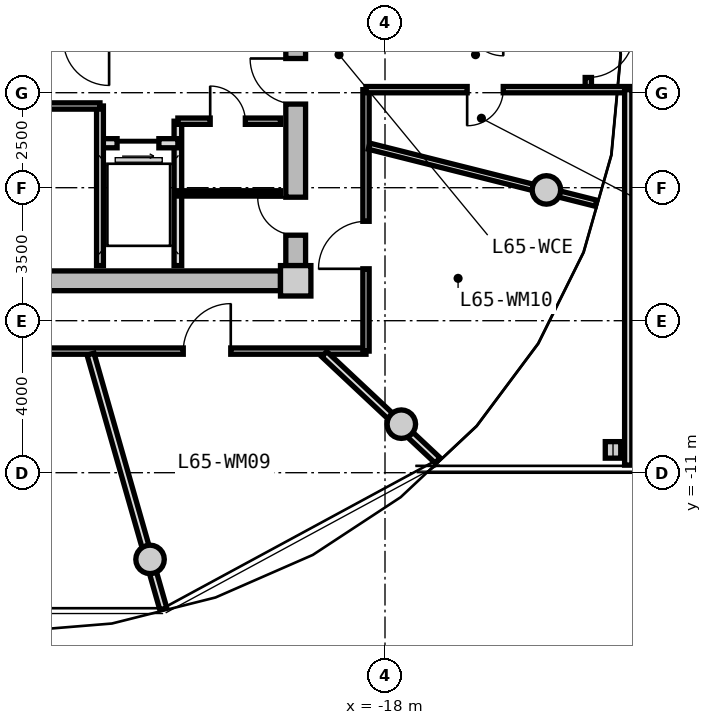
"""IFC4 building model, lengths in metres.
Left out: names, types, materials, properties, quantities, classifications, styles, units other than length and angle.
Written with IfcOpenShell. Run it as: python <this file> out.ifc"""

import sys

from ifc_helpers import new_model, si_unit, direction, frame, frame_2d, origin, origin_2d, place, context, subcontext, project, spatial, rectangle, circle, i_section, extrude, source, transform, mapped, element, fill, save


model = new_model("IFC4")
c1 = context("Model", 3, precision=1e-05, world=origin(), true_north=direction((0.0, 1.0)))
c2 = subcontext(c1, "Body", "Model", "MODEL_VIEW")
j1 = project(units=[si_unit("LENGTHUNIT", "METRE"), si_unit("PLANEANGLEUNIT", "RADIAN")], contexts=[c1])
p1 = place(None, origin())
s1 = spatial("IfcSite", under=j1, at=p1, CompositionType="ELEMENT")
p2 = place(p1, origin())
s2 = spatial("IfcBuilding", under=s1, at=p2, CompositionType="ELEMENT")
p3 = place(p2, frame((0.0, 0.0, 210.85)))
s3 = spatial("IfcBuildingStorey", under=s2, at=p3, CompositionType="ELEMENT", Elevation=210.85)
m1 = source(origin(), c2, "Body", "SweptSolid", [
    extrude(rectangle(XDim=0.8, YDim=0.8, at=origin_2d()), origin(), (0.0, 0.0, 1.0), 3.05),
])
p4 = place(p3, frame((-20.35, -5.95, 0.0), z_axis=(0.0, 0.0, 1.0), x_axis=(1.0, 0.0, 0.0)))
e1 = element("IfcColumn", 1, at=p4, inside=s3, PredefinedType="COLUMN", context=c2, shape_type="MappedRepresentation", body=[
    mapped(m1, transform((0.0, 0.0, 0.0), x_axis=(1.0, 0.0, 0.0), y_axis=(0.0, 1.0, 0.0), z_axis=(0.0, 0.0, 1.0), scale=1.0)),
])
m2 = source(origin(), c2, "Body", "SweptSolid", [
    extrude(rectangle(XDim=14.5, YDim=0.52, at=frame_2d((7.25, 0.0))), origin(), (0.0, 0.0, 1.0), 2.76),
])
p5 = place(p3, frame((-20.75, -5.95, 0.0), z_axis=(0.0, 0.0, 1.0), x_axis=(-1.0, 0.0, 0.0)))
e2 = element("IfcWall", 2, at=p5, inside=s3, PredefinedType="SHEAR", context=c2, shape_type="MappedRepresentation", body=[
    mapped(m2, transform((0.0, 0.0, 0.0), x_axis=(1.0, 0.0, 0.0), y_axis=(0.0, 1.0, 0.0), z_axis=(0.0, 0.0, 1.0), scale=1.0)),
])
m3 = source(origin(), c2, "Body", "SweptSolid", [
    extrude(rectangle(XDim=11.1, YDim=0.52, at=frame_2d((5.55, 0.0))), origin(), (0.0, 0.0, 1.0), 2.76),
])
p6 = place(p3, frame((-20.35, 5.55, 0.0), z_axis=(0.0, 0.0, 1.0), x_axis=(0.0, -1.0, 0.0)))
e3 = element("IfcWall", 3, at=p6, inside=s3, PredefinedType="SHEAR", context=c2, shape_type="MappedRepresentation", body=[
    mapped(m3, transform((0.0, 0.0, 0.0), x_axis=(1.0, 0.0, 0.0), y_axis=(0.0, 1.0, 0.0), z_axis=(0.0, 0.0, 1.0), scale=1.0)),
])
p7 = place(p6, frame((5.65, 0.0, 0.0)))
e4 = element("IfcOpeningElement", 4, at=p7, cuts=e3, PredefinedType="OPENING", context=c2, shape_type="SweptSolid", body=[
    extrude(rectangle(XDim=1.2, YDim=2.15, at=frame_2d((0.6, 1.075))), frame((0.0, 0.27, 0.0), z_axis=(0.0, -1.0, 0.0), x_axis=(1.0, 0.0, 0.0)), (0.0, 0.0, 1.0), 0.54),
])
p8 = place(p6, frame((9.3, 0.0, 0.0)))
e5 = element("IfcOpeningElement", 5, at=p8, cuts=e3, PredefinedType="OPENING", context=c2, shape_type="SweptSolid", body=[
    extrude(rectangle(XDim=1.0, YDim=2.1, at=frame_2d((0.5, 1.05))), frame((0.0, 0.27, 0.0), z_axis=(0.0, -1.0, 0.0), x_axis=(1.0, 0.0, 0.0)), (0.0, 0.0, 1.0), 0.54),
])
m4 = source(origin(), c2, "Body", "SweptSolid", [
    extrude(circle(Radius=0.375, at=origin_2d()), origin(), (0.0, 0.0, 1.0), 3.05),
])
for number, where, z_axis, x_axis in (
    (6, (-24.182, -13.281, 0.0), (0.0, 0.0, 1.0), (1.0, 0.0, 0.0)),
    (7, (-17.57, -9.723, 0.0), (0.0, 0.0, 1.0), (1.0, 0.0, 0.0)),
    (8, (-13.753, -3.559, 0.0), (0.0, 0.0, 1.0), (1.0, 0.0, 0.0)),
):
    element("IfcColumn", number, at=place(p3, frame(where, z_axis=z_axis, x_axis=x_axis)), inside=s3, PredefinedType="COLUMN", context=c2, shape_type="MappedRepresentation", body=[
        mapped(m4, transform((0.0, 0.0, 0.0), x_axis=(1.0, 0.0, 0.0), y_axis=(0.0, 1.0, 0.0), z_axis=(0.0, 0.0, 1.0), scale=1.0)),
    ])
m5 = source(origin(), c2, "Body", "SweptSolid", [
    extrude(i_section(OverallWidth=0.407, OverallDepth=0.435, WebThickness=0.024, FlangeThickness=0.039, FilletRadius=0.015, at=origin_2d()), origin(), (0.0, 0.0, 1.0), 3.05),
])
p9 = place(p3, frame((-12.0, -10.4, 0.0), z_axis=(0.0, 0.0, 1.0), x_axis=(1.0, 0.0, 0.0)))
e9 = element("IfcColumn", 9, at=p9, inside=s3, PredefinedType="COLUMN", context=c2, shape_type="MappedRepresentation", body=[
    mapped(m5, transform((0.0, 0.0, 0.0), x_axis=(1.0, 0.0, 0.0), y_axis=(0.0, 1.0, 0.0), z_axis=(0.0, 0.0, 1.0), scale=1.0)),
])
m6 = source(origin(), c2, "Body", "SweptSolid", [
    extrude(rectangle(XDim=3.8, YDim=0.2, at=frame_2d((1.9, 0.0))), origin(), (0.0, 0.0, 1.0), 2.745),
])
p10 = place(p3, frame((-23.45, -5.55, 0.0), z_axis=(0.0, 0.0, 1.0), x_axis=(0.0, 1.0, 0.0)))
e10 = element("IfcWall", 10, at=p10, inside=s3, PredefinedType="PARTITIONING", context=c2, shape_type="MappedRepresentation", body=[
    mapped(m6, transform((0.0, 0.0, 0.0), x_axis=(1.0, 0.0, 0.0), y_axis=(0.0, 1.0, 0.0), z_axis=(0.0, 0.0, 1.0), scale=1.0)),
])
m7 = source(origin(), c2, "Body", "SweptSolid", [
    extrude(rectangle(XDim=2.05, YDim=0.24, at=frame_2d((1.025, 0.0))), origin(), (0.0, 0.0, 1.0), 2.745),
])
p11 = place(p3, frame((-25.5, -2.33, 0.0), z_axis=(0.0, 0.0, 1.0), x_axis=(1.0, 0.0, 0.0)))
e11 = element("IfcWall", 11, at=p11, inside=s3, PredefinedType="PARTITIONING", context=c2, shape_type="MappedRepresentation", body=[
    mapped(m7, transform((0.0, 0.0, 0.0), x_axis=(1.0, 0.0, 0.0), y_axis=(0.0, 1.0, 0.0), z_axis=(0.0, 0.0, 1.0), scale=1.0)),
])
p12 = place(p11, frame((0.45, 0.0, 0.0)))
e12 = element("IfcOpeningElement", 12, at=p12, cuts=e11, PredefinedType="OPENING", context=c2, shape_type="SweptSolid", body=[
    extrude(rectangle(XDim=1.1, YDim=2.2, at=frame_2d((0.55, 1.1))), frame((0.0, 0.13, 0.0), z_axis=(0.0, -1.0, 0.0), x_axis=(1.0, 0.0, 0.0)), (0.0, 0.0, 1.0), 0.26),
])
m8 = source(origin(), c2, "Body", "SweptSolid", [
    extrude(rectangle(XDim=4.2, YDim=0.18, at=frame_2d((2.1, 0.0))), origin(), (0.0, 0.0, 1.0), 2.745),
])
p13 = place(p3, frame((-25.5, -5.55, 0.0), z_axis=(0.0, 0.0, 1.0), x_axis=(0.0, 1.0, 0.0)))
e13 = element("IfcWall", 13, at=p13, inside=s3, PredefinedType="PARTITIONING", context=c2, shape_type="MappedRepresentation", body=[
    mapped(m8, transform((0.0, 0.0, 0.0), x_axis=(1.0, 0.0, 0.0), y_axis=(0.0, 1.0, 0.0), z_axis=(0.0, 0.0, 1.0), scale=1.0)),
])
m9 = source(origin(), c2, "Body", "SweptSolid", [
    extrude(rectangle(XDim=4.77, YDim=0.165, at=frame_2d((2.385, 0.0))), origin(), (0.0, 0.0, 1.0), 2.745),
])
p14 = place(p3, frame((-30.27, -1.35, 0.0), z_axis=(0.0, 0.0, 1.0), x_axis=(1.0, 0.0, 0.0)))
e14 = element("IfcWall", 14, at=p14, inside=s3, PredefinedType="PARTITIONING", context=c2, shape_type="MappedRepresentation", body=[
    mapped(m9, transform((0.0, 0.0, 0.0), x_axis=(1.0, 0.0, 0.0), y_axis=(0.0, 1.0, 0.0), z_axis=(0.0, 0.0, 1.0), scale=1.0)),
])
p15 = place(p14, frame((1.85, 0.0, 0.0)))
e15 = element("IfcOpeningElement", 15, at=p15, cuts=e14, PredefinedType="OPENING", context=c2, shape_type="SweptSolid", body=[
    extrude(rectangle(XDim=1.0, YDim=2.1, at=frame_2d((0.5, 1.05))), frame((0.0, 0.093, 0.0), z_axis=(0.0, -1.0, 0.0), x_axis=(1.0, 0.0, 0.0)), (0.0, 0.0, 1.0), 0.185),
])
m10 = source(origin(), c2, "Body", "SweptSolid", [
    extrude(rectangle(XDim=2.7, YDim=0.165, at=frame_2d((1.35, 0.0))), origin(), (0.0, 0.0, 1.0), 2.745),
])
p16 = place(p3, frame((-23.45, -1.75, 0.0), z_axis=(0.0, 0.0, 1.0), x_axis=(1.0, 0.0, 0.0)))
e16 = element("IfcWall", 16, at=p16, inside=s3, PredefinedType="PARTITIONING", context=c2, shape_type="MappedRepresentation", body=[
    mapped(m10, transform((0.0, 0.0, 0.0), x_axis=(1.0, 0.0, 0.0), y_axis=(0.0, 1.0, 0.0), z_axis=(0.0, 0.0, 1.0), scale=1.0)),
])
p17 = place(p16, frame((0.85, 0.0, 0.0)))
e17 = element("IfcOpeningElement", 17, at=p17, cuts=e16, PredefinedType="OPENING", context=c2, shape_type="SweptSolid", body=[
    extrude(rectangle(XDim=0.925, YDim=2.1, at=frame_2d((0.462, 1.05))), frame((0.0, 0.093, 0.0), z_axis=(0.0, -1.0, 0.0), x_axis=(1.0, 0.0, 0.0)), (0.0, 0.0, 1.0), 0.185),
])
m11 = source(origin(), c2, "Body", "SweptSolid", [
    extrude(rectangle(XDim=2.7, YDim=0.14, at=frame_2d((1.35, 0.0))), origin(), (0.0, 0.0, 1.0), 2.745),
])
p18 = place(p3, frame((-23.45, -3.65, 0.0), z_axis=(0.0, 0.0, 1.0), x_axis=(1.0, 0.0, 0.0)))
e18 = element("IfcWall", 18, at=p18, inside=s3, PredefinedType="PARTITIONING", context=c2, shape_type="MappedRepresentation", body=[
    mapped(m11, transform((0.0, 0.0, 0.0), x_axis=(1.0, 0.0, 0.0), y_axis=(0.0, 1.0, 0.0), z_axis=(0.0, 0.0, 1.0), scale=1.0)),
])
m12 = source(origin(), c2, "Body", "SweptSolid", [
    extrude(rectangle(XDim=19.0, YDim=0.165, at=frame_2d((9.5, 0.0))), origin(), (0.0, 0.0, 1.0), 2.745),
])
p19 = place(p3, frame((-18.5, -7.8, 0.0), z_axis=(0.0, 0.0, 1.0), x_axis=(-1.0, 0.0, 0.0)))
e19 = element("IfcWall", 19, at=p19, inside=s3, PredefinedType="PARTITIONING", context=c2, shape_type="MappedRepresentation", body=[
    mapped(m12, transform((0.0, 0.0, 0.0), x_axis=(1.0, 0.0, 0.0), y_axis=(0.0, 1.0, 0.0), z_axis=(0.0, 0.0, 1.0), scale=1.0)),
])
p20 = place(p19, frame((12.569, 0.0, 0.0)))
e20 = element("IfcOpeningElement", 20, at=p20, cuts=e19, PredefinedType="OPENING", context=c2, shape_type="SweptSolid", body=[
    extrude(rectangle(XDim=1.25, YDim=2.2, at=frame_2d((0.625, 1.1))), frame((0.0, 0.093, 0.0), z_axis=(0.0, -1.0, 0.0), x_axis=(1.0, 0.0, 0.0)), (0.0, 0.0, 1.0), 0.185),
])
p21 = place(p19, frame((8.875, 0.0, 0.0)))
e21 = element("IfcOpeningElement", 21, at=p21, cuts=e19, PredefinedType="OPENING", context=c2, shape_type="SweptSolid", body=[
    extrude(rectangle(XDim=1.25, YDim=2.2, at=frame_2d((0.625, 1.1))), frame((0.0, 0.093, 0.0), z_axis=(0.0, -1.0, 0.0), x_axis=(1.0, 0.0, 0.0)), (0.0, 0.0, 1.0), 0.185),
])
p22 = place(p19, frame((3.559, 0.0, 0.0)))
e22 = element("IfcOpeningElement", 22, at=p22, cuts=e19, PredefinedType="OPENING", context=c2, shape_type="SweptSolid", body=[
    extrude(rectangle(XDim=1.25, YDim=2.2, at=frame_2d((0.625, 1.1))), frame((0.0, 0.093, 0.0), z_axis=(0.0, -1.0, 0.0), x_axis=(1.0, 0.0, 0.0)), (0.0, 0.0, 1.0), 0.185),
])
m13 = source(origin(), c2, "Body", "SweptSolid", [
    extrude(rectangle(XDim=6.88, YDim=0.165, at=frame_2d((3.44, 0.0))), origin(), (0.0, 0.0, 1.0), 2.745),
])
p23 = place(p3, frame((-18.5, -0.92, 0.0), z_axis=(0.0, 0.0, 1.0), x_axis=(0.0, -1.0, 0.0)))
e23 = element("IfcWall", 23, at=p23, inside=s3, PredefinedType="PARTITIONING", context=c2, shape_type="MappedRepresentation", body=[
    mapped(m13, transform((0.0, 0.0, 0.0), x_axis=(1.0, 0.0, 0.0), y_axis=(0.0, 1.0, 0.0), z_axis=(0.0, 0.0, 1.0), scale=1.0)),
])
p24 = place(p23, frame((3.464, 0.0, 0.0)))
e24 = element("IfcOpeningElement", 24, at=p24, cuts=e23, PredefinedType="OPENING", context=c2, shape_type="SweptSolid", body=[
    extrude(rectangle(XDim=1.25, YDim=2.2, at=frame_2d((0.625, 1.1))), frame((0.0, 0.093, 0.0), z_axis=(0.0, -1.0, 0.0), x_axis=(1.0, 0.0, 0.0)), (0.0, 0.0, 1.0), 0.185),
])
m14 = source(origin(), c2, "Body", "SweptSolid", [
    extrude(rectangle(XDim=6.157, YDim=0.165, at=frame_2d((3.079, 0.0))), origin(), (0.0, 0.0, 1.0), 2.345),
])
p25 = place(p3, frame((-18.42, -2.407, 0.0), z_axis=(0.0, 0.0, 1.0), x_axis=(0.969840867184, -0.243738984038, 0.0)))
e25 = element("IfcWall", 25, at=p25, inside=s3, PredefinedType="PARTITIONING", context=c2, shape_type="MappedRepresentation", body=[
    mapped(m14, transform((0.0, 0.0, 0.0), x_axis=(1.0, 0.0, 0.0), y_axis=(0.0, 1.0, 0.0), z_axis=(0.0, 0.0, 1.0), scale=1.0)),
])
m15 = source(origin(), c2, "Body", "SweptSolid", [
    extrude(rectangle(XDim=6.974, YDim=0.19, at=frame_2d((3.487, 0.0))), origin(), (0.0, 0.0, 1.0), 2.345),
])
p26 = place(p3, frame((-25.749, -7.88, 0.0), z_axis=(0.0, 0.0, 1.0), x_axis=(0.274707256801, -0.961527910703, 0.0)))
e26 = element("IfcWall", 26, at=p26, inside=s3, PredefinedType="PARTITIONING", context=c2, shape_type="MappedRepresentation", body=[
    mapped(m15, transform((0.0, 0.0, 0.0), x_axis=(1.0, 0.0, 0.0), y_axis=(0.0, 1.0, 0.0), z_axis=(0.0, 0.0, 1.0), scale=1.0)),
])
m16 = source(origin(), c2, "Body", "SweptSolid", [
    extrude(rectangle(XDim=4.089, YDim=0.19, at=frame_2d((2.044, 0.0))), origin(), (0.0, 0.0, 1.0), 2.345),
])
p27 = place(p3, frame((-19.598, -7.88, 0.0), z_axis=(0.0, 0.0, 1.0), x_axis=(0.729401273609, -0.684086092577, 0.0)))
e27 = element("IfcWall", 27, at=p27, inside=s3, PredefinedType="PARTITIONING", context=c2, shape_type="MappedRepresentation", body=[
    mapped(m16, transform((0.0, 0.0, 0.0), x_axis=(1.0, 0.0, 0.0), y_axis=(0.0, 1.0, 0.0), z_axis=(0.0, 0.0, 1.0), scale=1.0)),
])
m17 = source(origin(), c2, "Body", "SweptSolid", [
    extrude(rectangle(XDim=1.84, YDim=0.165, at=frame_2d((0.92, 0.0))), origin(), (0.0, 0.0, 1.0), 2.745),
])
p28 = place(p3, frame((-12.65, -0.92, 0.0), z_axis=(0.0, 0.0, 1.0), x_axis=(0.0, 1.0, 0.0)))
e28 = element("IfcWall", 28, at=p28, inside=s3, PredefinedType="PARTITIONING", context=c2, shape_type="MappedRepresentation", body=[
    mapped(m17, transform((0.0, 0.0, 0.0), x_axis=(1.0, 0.0, 0.0), y_axis=(0.0, 1.0, 0.0), z_axis=(0.0, 0.0, 1.0), scale=1.0)),
])
p29 = place(p28, frame((0.32, 0.0, 0.0)))
e29 = element("IfcOpeningElement", 29, at=p29, cuts=e28, PredefinedType="OPENING", context=c2, shape_type="SweptSolid", body=[
    extrude(rectangle(XDim=1.2, YDim=2.15, at=frame_2d((0.6, 1.075))), frame((0.0, 0.093, 0.0), z_axis=(0.0, -1.0, 0.0), x_axis=(1.0, 0.0, 0.0)), (0.0, 0.0, 1.0), 0.185),
])
m18 = source(origin(), c2, "Body", "SweptSolid", [
    extrude(rectangle(XDim=37.0, YDim=0.165, at=frame_2d((18.5, 0.0))), origin(), (0.0, 0.0, 1.0), 2.745),
])
p30 = place(p3, frame((-18.5, -0.92, 0.0), z_axis=(0.0, 0.0, 1.0), x_axis=(1.0, 0.0, 0.0)))
e30 = element("IfcWall", 30, at=p30, inside=s3, PredefinedType="PARTITIONING", context=c2, shape_type="MappedRepresentation", body=[
    mapped(m18, transform((0.0, 0.0, 0.0), x_axis=(1.0, 0.0, 0.0), y_axis=(0.0, 1.0, 0.0), z_axis=(0.0, 0.0, 1.0), scale=1.0)),
])
p31 = place(p30, frame((2.662, 0.0, 0.0)))
e31 = element("IfcOpeningElement", 31, at=p31, cuts=e30, PredefinedType="OPENING", context=c2, shape_type="SweptSolid", body=[
    extrude(rectangle(XDim=0.95, YDim=2.1, at=frame_2d((0.475, 1.05))), frame((0.0, 0.093, 0.0), z_axis=(0.0, -1.0, 0.0), x_axis=(1.0, 0.0, 0.0)), (0.0, 0.0, 1.0), 0.185),
])
p32 = place(p30, frame((33.388, 0.0, 0.0)))
e32 = element("IfcOpeningElement", 32, at=p32, cuts=e30, PredefinedType="OPENING", context=c2, shape_type="SweptSolid", body=[
    extrude(rectangle(XDim=0.95, YDim=2.1, at=frame_2d((0.475, 1.05))), frame((0.0, 0.093, 0.0), z_axis=(0.0, -1.0, 0.0), x_axis=(1.0, 0.0, 0.0)), (0.0, 0.0, 1.0), 0.185),
])
p33 = place(p30, frame((9.075, 0.0, 0.0)))
e33 = element("IfcOpeningElement", 33, at=p33, cuts=e30, PredefinedType="OPENING", context=c2, shape_type="SweptSolid", body=[
    extrude(rectangle(XDim=1.25, YDim=2.2, at=frame_2d((0.625, 1.1))), frame((0.0, 0.093, 0.0), z_axis=(0.0, -1.0, 0.0), x_axis=(1.0, 0.0, 0.0)), (0.0, 0.0, 1.0), 0.185),
])
p34 = place(p30, frame((14.875, 0.0, 0.0)))
e34 = element("IfcOpeningElement", 34, at=p34, cuts=e30, PredefinedType="OPENING", context=c2, shape_type="SweptSolid", body=[
    extrude(rectangle(XDim=1.25, YDim=2.2, at=frame_2d((0.625, 1.1))), frame((0.0, 0.093, 0.0), z_axis=(0.0, -1.0, 0.0), x_axis=(1.0, 0.0, 0.0)), (0.0, 0.0, 1.0), 0.185),
])
p35 = place(p30, frame((20.875, 0.0, 0.0)))
e35 = element("IfcOpeningElement", 35, at=p35, cuts=e30, PredefinedType="OPENING", context=c2, shape_type="SweptSolid", body=[
    extrude(rectangle(XDim=1.25, YDim=2.2, at=frame_2d((0.625, 1.1))), frame((0.0, 0.093, 0.0), z_axis=(0.0, -1.0, 0.0), x_axis=(1.0, 0.0, 0.0)), (0.0, 0.0, 1.0), 0.185),
])
p36 = place(p30, frame((26.675, 0.0, 0.0)))
e36 = element("IfcOpeningElement", 36, at=p36, cuts=e30, PredefinedType="OPENING", context=c2, shape_type="SweptSolid", body=[
    extrude(rectangle(XDim=1.25, YDim=2.2, at=frame_2d((0.625, 1.1))), frame((0.0, 0.093, 0.0), z_axis=(0.0, -1.0, 0.0), x_axis=(1.0, 0.0, 0.0)), (0.0, 0.0, 1.0), 0.185),
])
m19 = source(origin(), c2, "Body", "SweptSolid", [
    extrude(rectangle(XDim=9.88, YDim=0.19, at=frame_2d((4.94, 0.0))), origin(), (0.0, 0.0, 1.0), 2.745),
])
p37 = place(p3, frame((-11.6, -10.8, 0.0), z_axis=(0.0, 0.0, 1.0), x_axis=(0.0, 1.0, 0.0)))
e37 = element("IfcWall", 37, at=p37, inside=s3, PredefinedType="PARTITIONING", context=c2, shape_type="MappedRepresentation", body=[
    mapped(m19, transform((0.0, 0.0, 0.0), x_axis=(1.0, 0.0, 0.0), y_axis=(0.0, 1.0, 0.0), z_axis=(0.0, 0.0, 1.0), scale=1.0)),
])
m20 = source(origin(), c2, "Body", "SweptSolid", [
    extrude(rectangle(XDim=1.2, YDim=2.15, at=frame_2d((0.6, 1.075))), frame((0.0, 0.025, 0.0), z_axis=(0.0, -1.0, 0.0), x_axis=(1.0, 0.0, 0.0)), (0.0, 0.0, 1.0), 0.05),
])
p38 = place(p7, frame((1.2, 0.0, 0.0), z_axis=(0.0, 0.0, 1.0), x_axis=(-1.0, 0.0, 0.0)))
e38 = element("IfcDoor", 38, at=p38, inside=s3, OperationType="SINGLE_SWING_RIGHT", PredefinedType="DOOR", context=c2, shape_type="MappedRepresentation", body=[
    mapped(m20, transform((0.0, 0.0, 0.0), x_axis=(1.0, 0.0, 0.0), y_axis=(0.0, 1.0, 0.0), z_axis=(0.0, 0.0, 1.0), scale=1.0)),
])
fill(e4, e38)
m21 = source(origin(), c2, "Body", "SweptSolid", [
    extrude(rectangle(XDim=1.1, YDim=2.2, at=frame_2d((0.55, 1.1))), frame((0.0, 0.025, 0.0), z_axis=(0.0, -1.0, 0.0), x_axis=(1.0, 0.0, 0.0)), (0.0, 0.0, 1.0), 0.05),
])
p39 = place(p12, frame((1.1, 0.0, 0.0), z_axis=(0.0, 0.0, 1.0), x_axis=(-1.0, 0.0, 0.0)))
e39 = element("IfcDoor", 39, at=p39, inside=s3, OperationType="SLIDING_TO_RIGHT", PredefinedType="DOOR", context=c2, shape_type="MappedRepresentation", body=[
    mapped(m21, transform((0.0, 0.0, 0.0), x_axis=(1.0, 0.0, 0.0), y_axis=(0.0, 1.0, 0.0), z_axis=(0.0, 0.0, 1.0), scale=1.0)),
])
fill(e12, e39)
m22 = source(origin(), c2, "Body", "SweptSolid", [
    extrude(rectangle(XDim=0.925, YDim=2.1, at=frame_2d((0.462, 1.05))), frame((0.0, 0.025, 0.0), z_axis=(0.0, -1.0, 0.0), x_axis=(1.0, 0.0, 0.0)), (0.0, 0.0, 1.0), 0.05),
])
p40 = place(p17, origin())
e40 = element("IfcDoor", 40, at=p40, inside=s3, OperationType="SINGLE_SWING_LEFT", PredefinedType="DOOR", context=c2, shape_type="MappedRepresentation", body=[
    mapped(m22, transform((0.0, 0.0, 0.0), x_axis=(1.0, 0.0, 0.0), y_axis=(0.0, 1.0, 0.0), z_axis=(0.0, 0.0, 1.0), scale=1.0)),
])
fill(e17, e40)
m23 = source(origin(), c2, "Body", "SweptSolid", [
    extrude(rectangle(XDim=1.0, YDim=2.1, at=frame_2d((0.5, 1.05))), frame((0.0, 0.025, 0.0), z_axis=(0.0, -1.0, 0.0), x_axis=(1.0, 0.0, 0.0)), (0.0, 0.0, 1.0), 0.05),
])
p41 = place(p8, frame((1.0, 0.0, 0.0), z_axis=(0.0, 0.0, 1.0), x_axis=(-1.0, 0.0, 0.0)))
e41 = element("IfcDoor", 41, at=p41, inside=s3, OperationType="SINGLE_SWING_RIGHT", PredefinedType="DOOR", context=c2, shape_type="MappedRepresentation", body=[
    mapped(m23, transform((0.0, 0.0, 0.0), x_axis=(1.0, 0.0, 0.0), y_axis=(0.0, 1.0, 0.0), z_axis=(0.0, 0.0, 1.0), scale=1.0)),
])
fill(e5, e41)
m24 = source(origin(), c2, "Body", "SweptSolid", [
    extrude(rectangle(XDim=0.95, YDim=2.1, at=frame_2d((0.475, 1.05))), frame((0.0, 0.025, 0.0), z_axis=(0.0, -1.0, 0.0), x_axis=(1.0, 0.0, 0.0)), (0.0, 0.0, 1.0), 0.05),
])
p42 = place(p31, frame((0.95, 0.0, 0.0), z_axis=(0.0, 0.0, 1.0), x_axis=(-1.0, 0.0, 0.0)))
e42 = element("IfcDoor", 42, at=p42, inside=s3, OperationType="SINGLE_SWING_RIGHT", PredefinedType="DOOR", context=c2, shape_type="MappedRepresentation", body=[
    mapped(m24, transform((0.0, 0.0, 0.0), x_axis=(1.0, 0.0, 0.0), y_axis=(0.0, 1.0, 0.0), z_axis=(0.0, 0.0, 1.0), scale=1.0)),
])
fill(e31, e42)
m25 = source(origin(), c2, "Body", "SweptSolid", [
    extrude(rectangle(XDim=1.25, YDim=2.2, at=frame_2d((0.625, 1.1))), frame((0.0, 0.025, 0.0), z_axis=(0.0, -1.0, 0.0), x_axis=(1.0, 0.0, 0.0)), (0.0, 0.0, 1.0), 0.05),
])
p43 = place(p22, frame((1.25, 0.0, 0.0), z_axis=(0.0, 0.0, 1.0), x_axis=(-1.0, 0.0, 0.0)))
e43 = element("IfcDoor", 43, at=p43, inside=s3, OperationType="SINGLE_SWING_RIGHT", PredefinedType="DOOR", context=c2, shape_type="MappedRepresentation", body=[
    mapped(m25, transform((0.0, 0.0, 0.0), x_axis=(1.0, 0.0, 0.0), y_axis=(0.0, 1.0, 0.0), z_axis=(0.0, 0.0, 1.0), scale=1.0)),
])
fill(e22, e43)
p44 = place(p24, frame((1.25, 0.0, 0.0), z_axis=(0.0, 0.0, 1.0), x_axis=(-1.0, 0.0, 0.0)))
e44 = element("IfcDoor", 44, at=p44, inside=s3, OperationType="SINGLE_SWING_LEFT", PredefinedType="DOOR", context=c2, shape_type="MappedRepresentation", body=[
    mapped(m25, transform((0.0, 0.0, 0.0), x_axis=(1.0, 0.0, 0.0), y_axis=(0.0, 1.0, 0.0), z_axis=(0.0, 0.0, 1.0), scale=1.0)),
])
fill(e24, e44)
p45 = place(p29, frame((1.2, 0.0, 0.0), z_axis=(0.0, 0.0, 1.0), x_axis=(-1.0, 0.0, 0.0)))
e45 = element("IfcDoor", 45, at=p45, inside=s3, OperationType="SINGLE_SWING_LEFT", PredefinedType="DOOR", context=c2, shape_type="MappedRepresentation", body=[
    mapped(m20, transform((0.0, 0.0, 0.0), x_axis=(1.0, 0.0, 0.0), y_axis=(0.0, 1.0, 0.0), z_axis=(0.0, 0.0, 1.0), scale=1.0)),
])
fill(e29, e45)
save(model, sys.argv[1])
